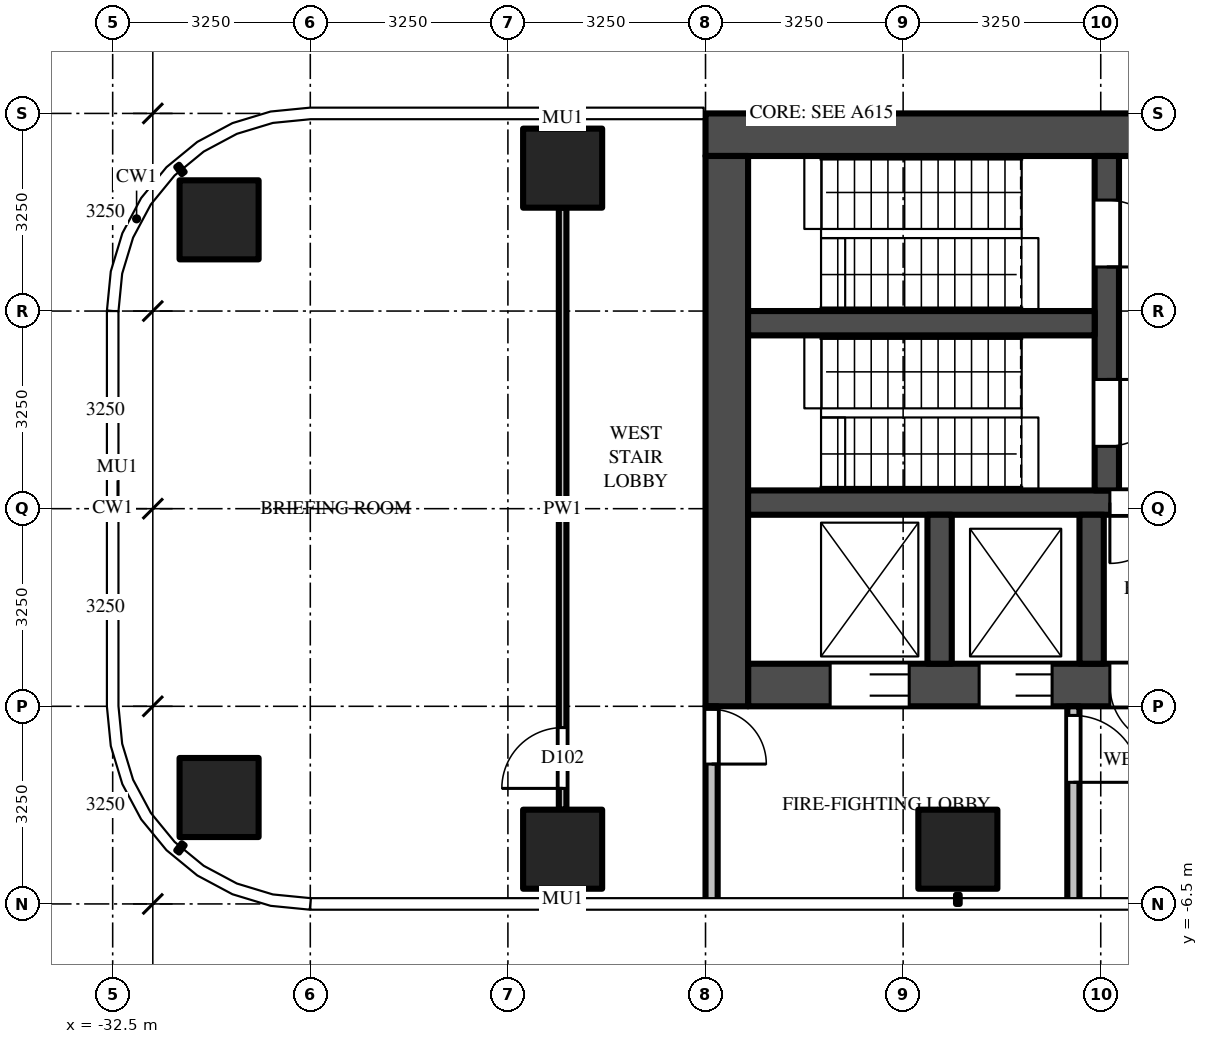
"""IFC4 building model, lengths in metres.
Left out: names, types, materials, properties, quantities, classifications, styles, units other than length and angle.
Written with IfcOpenShell. Run it as: python <this file> out.ifc"""

import sys

from ifc_helpers import new_model, si_unit, direction, frame, frame_2d, origin, origin_2d, place, context, subcontext, project, spatial, rectangle, extrude, source, transform, mapped, element, fill, save


model = new_model("IFC4")
c1 = context("Model", 3, precision=1e-05, world=origin(), true_north=direction((0.0, 1.0)))
c2 = subcontext(c1, "Body", "Model", "MODEL_VIEW")
j1 = project(units=[si_unit("LENGTHUNIT", "METRE"), si_unit("PLANEANGLEUNIT", "RADIAN")], contexts=[c1])
p1 = place(None, origin())
s1 = spatial("IfcSite", under=j1, at=p1, CompositionType="ELEMENT")
p2 = place(p1, origin())
s2 = spatial("IfcBuilding", under=s1, at=p2, CompositionType="ELEMENT")
p3 = place(p2, frame((0.0, 0.0, 129.0)))
s3 = spatial("IfcBuildingStorey", under=s2, at=p3, CompositionType="ELEMENT", Elevation=129.0)
m1 = source(origin(), c2, "Body", "SweptSolid", [
    extrude(rectangle(XDim=1.3, YDim=1.3, at=origin_2d()), origin(), (0.0, 0.0, 1.0), 4.5),
])
for number, where, z_axis, x_axis in (
    (1, (-18.6, -5.6, 0.0), (0.0, 0.0, 1.0), (1.0, 0.0, 0.0)),
    (2, (-25.1, -5.6, 0.0), (0.0, 0.0, 1.0), (1.0, 0.0, 0.0)),
    (3, (-30.75, -4.75, 0.0), (0.0, 0.0, 1.0), (1.0, 0.0, 0.0)),
    (4, (-25.1, 5.6, 0.0), (0.0, 0.0, 1.0), (1.0, 0.0, 0.0)),
    (5, (-30.75, 4.75, 0.0), (0.0, 0.0, 1.0), (1.0, 0.0, 0.0)),
):
    element("IfcColumn", number, at=place(p3, frame(where, z_axis=z_axis, x_axis=x_axis)), inside=s3, PredefinedType="COLUMN", context=c2, shape_type="MappedRepresentation", body=[
        mapped(m1, transform((0.0, 0.0, 0.0))),
    ])
m2 = source(origin(), c2, "Body", "SweptSolid", [
    extrude(rectangle(XDim=16.5, YDim=0.7, at=frame_2d((8.25, 0.0))), origin(), (0.0, 0.0, 1.0), 4.25),
])
p4 = place(p3, frame((-6.25, 6.15, 0.0), z_axis=(0.0, 0.0, 1.0), x_axis=(-1.0, 0.0, 0.0)))
e6 = element("IfcWall", 6, at=p4, inside=s3, PredefinedType="SHEAR", context=c2, shape_type="MappedRepresentation", body=[
    mapped(m2, transform((0.0, 0.0, 0.0))),
])
m3 = source(origin(), c2, "Body", "SweptSolid", [
    extrude(rectangle(XDim=14.85, YDim=0.7, at=frame_2d((7.425, 0.0))), origin(), (0.0, 0.0, 1.0), 4.25),
])
p5 = place(p3, frame((-7.2, -2.9, 0.0), z_axis=(0.0, 0.0, 1.0), x_axis=(-1.0, 0.0, 0.0)))
e7 = element("IfcWall", 7, at=p5, inside=s3, PredefinedType="SHEAR", context=c2, shape_type="MappedRepresentation", body=[
    mapped(m3, transform((0.0, 0.0, 0.0))),
])
m4 = source(origin(), c2, "Body", "SweptSolid", [
    extrude(rectangle(XDim=1.3, YDim=2.1, at=frame_2d((0.65, 1.05))), frame((0.0, 0.36, 0.0), z_axis=(0.0, -1.0, 0.0), x_axis=(1.0, 0.0, 0.0)), (0.0, 0.0, 1.0), 0.72),
])
p6 = place(p5, frame((12.2, 0.0, 0.0)))
e8 = element("IfcOpeningElement", 8, at=p6, cuts=e7, PredefinedType="OPENING", context=c2, shape_type="MappedRepresentation", body=[
    mapped(m4, transform((0.0, 0.0, 0.0))),
])
m5 = source(origin(), c2, "Body", "SweptSolid", [
    extrude(rectangle(XDim=1.2, YDim=2.1, at=frame_2d((0.6, 1.05))), frame((0.0, 0.36, 0.0), z_axis=(0.0, -1.0, 0.0), x_axis=(1.0, 0.0, 0.0)), (0.0, 0.0, 1.0), 0.72),
])
p7 = place(p5, frame((9.85, 0.0, 0.0)))
e9 = element("IfcOpeningElement", 9, at=p7, cuts=e7, PredefinedType="OPENING", context=c2, shape_type="MappedRepresentation", body=[
    mapped(m5, transform((0.0, 0.0, 0.0))),
])
m6 = source(origin(), c2, "Body", "SweptSolid", [
    extrude(rectangle(XDim=1.0, YDim=2.1, at=frame_2d((0.5, 1.05))), frame((0.0, 0.36, 0.0), z_axis=(0.0, -1.0, 0.0), x_axis=(1.0, 0.0, 0.0)), (0.0, 0.0, 1.0), 0.72),
])
p8 = place(p5, frame((7.9, 0.0, 0.0)))
e10 = element("IfcOpeningElement", 10, at=p8, cuts=e7, PredefinedType="OPENING", context=c2, shape_type="MappedRepresentation", body=[
    mapped(m6, transform((0.0, 0.0, 0.0))),
])
m7 = source(origin(), c2, "Body", "SweptSolid", [
    extrude(rectangle(XDim=0.9, YDim=2.1, at=frame_2d((0.45, 1.05))), frame((0.0, 0.36, 0.0), z_axis=(0.0, -1.0, 0.0), x_axis=(1.0, 0.0, 0.0)), (0.0, 0.0, 1.0), 0.72),
])
p9 = place(p5, frame((0.65, 0.0, 0.0)))
e11 = element("IfcOpeningElement", 11, at=p9, cuts=e7, PredefinedType="OPENING", context=c2, shape_type="MappedRepresentation", body=[
    mapped(m7, transform((0.0, 0.0, 0.0))),
])
p10 = place(p5, frame((3.2, 0.0, 0.0)))
e12 = element("IfcOpeningElement", 12, at=p10, cuts=e7, PredefinedType="OPENING", context=c2, shape_type="MappedRepresentation", body=[
    mapped(m6, transform((0.0, 0.0, 0.0))),
])
p11 = place(p5, frame((5.85, 0.0, 0.0)))
e13 = element("IfcOpeningElement", 13, at=p11, cuts=e7, PredefinedType="OPENING", context=c2, shape_type="MappedRepresentation", body=[
    mapped(m7, transform((0.0, 0.0, 0.0))),
])
m8 = source(origin(), c2, "Body", "SweptSolid", [
    extrude(rectangle(XDim=9.05, YDim=0.7, at=frame_2d((4.525, 0.0))), origin(), (0.0, 0.0, 1.0), 4.25),
])
p12 = place(p3, frame((-22.4, 5.8, 0.0), z_axis=(0.0, 0.0, 1.0), x_axis=(0.0, -1.0, 0.0)))
e14 = element("IfcWall", 14, at=p12, inside=s3, PredefinedType="SHEAR", context=c2, shape_type="MappedRepresentation", body=[
    mapped(m8, transform((0.0, 0.0, 0.0))),
])
m9 = source(origin(), c2, "Body", "SweptSolid", [
    extrude(rectangle(XDim=14.85, YDim=0.4, at=frame_2d((7.425, 0.0))), origin(), (0.0, 0.0, 1.0), 4.25),
])
p13 = place(p3, frame((-7.2, 0.1, 0.0), z_axis=(0.0, 0.0, 1.0), x_axis=(-1.0, 0.0, 0.0)))
e15 = element("IfcWall", 15, at=p13, inside=s3, PredefinedType="SHEAR", context=c2, shape_type="MappedRepresentation", body=[
    mapped(m9, transform((0.0, 0.0, 0.0))),
])
m10 = source(origin(), c2, "Body", "SweptSolid", [
    extrude(rectangle(XDim=1.0, YDim=2.1, at=frame_2d((0.5, 1.05))), frame((0.0, 0.21, 0.0), z_axis=(0.0, -1.0, 0.0), x_axis=(1.0, 0.0, 0.0)), (0.0, 0.0, 1.0), 0.42),
])
p14 = place(p13, frame((7.9, 0.0, 0.0)))
e16 = element("IfcOpeningElement", 16, at=p14, cuts=e15, PredefinedType="OPENING", context=c2, shape_type="MappedRepresentation", body=[
    mapped(m10, transform((0.0, 0.0, 0.0))),
])
m11 = source(origin(), c2, "Body", "SweptSolid", [
    extrude(rectangle(XDim=5.5, YDim=0.4, at=frame_2d((2.75, 0.0))), origin(), (0.0, 0.0, 1.0), 4.25),
])
p15 = place(p3, frame((-16.15, 5.8, 0.0), z_axis=(0.0, 0.0, 1.0), x_axis=(0.0, -1.0, 0.0)))
e17 = element("IfcWall", 17, at=p15, inside=s3, PredefinedType="SHEAR", context=c2, shape_type="MappedRepresentation", body=[
    mapped(m11, transform((0.0, 0.0, 0.0))),
])
m12 = source(origin(), c2, "Body", "SweptSolid", [
    extrude(rectangle(XDim=1.1, YDim=2.1, at=frame_2d((0.55, 1.05))), frame((0.0, 0.21, 0.0), z_axis=(0.0, -1.0, 0.0), x_axis=(1.0, 0.0, 0.0)), (0.0, 0.0, 1.0), 0.42),
])
p16 = place(p15, frame((0.725, 0.0, 0.0)))
e18 = element("IfcOpeningElement", 18, at=p16, cuts=e17, PredefinedType="OPENING", context=c2, shape_type="MappedRepresentation", body=[
    mapped(m12, transform((0.0, 0.0, 0.0))),
])
p17 = place(p15, frame((3.675, 0.0, 0.0)))
e19 = element("IfcOpeningElement", 19, at=p17, cuts=e17, PredefinedType="OPENING", context=c2, shape_type="MappedRepresentation", body=[
    mapped(m12, transform((0.0, 0.0, 0.0))),
])
m13 = source(origin(), c2, "Body", "SweptSolid", [
    extrude(rectangle(XDim=5.7, YDim=0.4, at=frame_2d((2.85, 0.0))), origin(), (0.0, 0.0, 1.0), 4.25),
])
p18 = place(p3, frame((-16.35, 3.05, 0.0), z_axis=(0.0, 0.0, 1.0), x_axis=(-1.0, 0.0, 0.0)))
e20 = element("IfcWall", 20, at=p18, inside=s3, PredefinedType="SHEAR", context=c2, shape_type="MappedRepresentation", body=[
    mapped(m13, transform((0.0, 0.0, 0.0))),
])
m14 = source(origin(), c2, "Body", "SweptSolid", [
    extrude(rectangle(XDim=2.45, YDim=0.4, at=frame_2d((1.225, 0.0))), origin(), (0.0, 0.0, 1.0), 4.25),
])
for number, where, z_axis, x_axis in (
    (21, (-16.4, -0.1, 0.0), (0.0, 0.0, 1.0), (0.0, -1.0, 0.0)),
    (22, (-18.9, -0.1, 0.0), (0.0, 0.0, 1.0), (0.0, -1.0, 0.0)),
):
    element("IfcWall", number, at=place(p3, frame(where, z_axis=z_axis, x_axis=x_axis)), inside=s3, PredefinedType="SHEAR", context=c2, shape_type="MappedRepresentation", body=[
        mapped(m14, transform((0.0, 0.0, 0.0))),
    ])
m15 = source(origin(), c2, "Body", "SweptSolid", [
    extrude(rectangle(XDim=3.25, YDim=0.2, at=frame_2d((1.625, 0.0))), origin(), (0.0, 0.0, 1.0), 4.25),
])
p19 = place(p3, frame((-16.7, -3.25, 0.0), z_axis=(0.0, 0.0, 1.0), x_axis=(0.0, -1.0, 0.0)))
e23 = element("IfcWall", 23, at=p19, inside=s3, PredefinedType="PARTITIONING", context=c2, shape_type="MappedRepresentation", body=[
    mapped(m15, transform((0.0, 0.0, 0.0))),
])
m16 = source(origin(), c2, "Body", "SweptSolid", [
    extrude(rectangle(XDim=1.1, YDim=2.1, at=frame_2d((0.55, 1.05))), frame((0.0, 0.11, 0.0), z_axis=(0.0, -1.0, 0.0), x_axis=(1.0, 0.0, 0.0)), (0.0, 0.0, 1.0), 0.22),
])
p20 = place(p19, frame((0.15, 0.0, 0.0)))
e24 = element("IfcOpeningElement", 24, at=p20, cuts=e23, PredefinedType="OPENING", context=c2, shape_type="MappedRepresentation", body=[
    mapped(m16, transform((0.0, 0.0, 0.0))),
])
p21 = place(p3, frame((-22.65, -3.25, 0.0), z_axis=(0.0, 0.0, 1.0), x_axis=(0.0, -1.0, 0.0)))
e25 = element("IfcWall", 25, at=p21, inside=s3, PredefinedType="PARTITIONING", context=c2, shape_type="MappedRepresentation", body=[
    mapped(m15, transform((0.0, 0.0, 0.0))),
])
m17 = source(origin(), c2, "Body", "SweptSolid", [
    extrude(rectangle(XDim=0.9, YDim=2.1, at=frame_2d((0.45, 1.05))), frame((0.0, 0.11, 0.0), z_axis=(0.0, -1.0, 0.0), x_axis=(1.0, 0.0, 0.0)), (0.0, 0.0, 1.0), 0.22),
])
p22 = place(p21, frame((0.05, 0.0, 0.0)))
e26 = element("IfcOpeningElement", 26, at=p22, cuts=e25, PredefinedType="OPENING", context=c2, shape_type="MappedRepresentation", body=[
    mapped(m17, transform((0.0, 0.0, 0.0))),
])
m18 = source(origin(), c2, "Body", "SweptSolid", [
    extrude(rectangle(XDim=9.9, YDim=0.125, at=frame_2d((4.95, 0.0))), origin(), (0.0, 0.0, 1.0), 3.468),
])
p23 = place(p3, frame((-25.1, -4.95, 0.0), z_axis=(0.0, 0.0, 1.0), x_axis=(0.0, 1.0, 0.0)))
e27 = element("IfcWall", 27, at=p23, inside=s3, PredefinedType="PARTITIONING", context=c2, shape_type="MappedRepresentation", body=[
    mapped(m18, transform((0.0, 0.0, 0.0))),
])
m19 = source(origin(), c2, "Body", "SweptSolid", [
    extrude(rectangle(XDim=1.0, YDim=2.1, at=frame_2d((0.5, 1.05))), frame((0.0, 0.073, 0.0), z_axis=(0.0, -1.0, 0.0), x_axis=(1.0, 0.0, 0.0)), (0.0, 0.0, 1.0), 0.145),
])
p24 = place(p23, frame((0.35, 0.0, 0.0)))
e28 = element("IfcOpeningElement", 28, at=p24, cuts=e27, PredefinedType="OPENING", context=c2, shape_type="MappedRepresentation", body=[
    mapped(m19, transform((0.0, 0.0, 0.0))),
])
m20 = source(origin(), c2, "Body", "SweptSolid", [
    extrude(rectangle(XDim=1.3, YDim=2.1, at=frame_2d((0.65, 1.05))), frame((0.0, -0.275, 0.0), z_axis=(0.0, -1.0, 0.0), x_axis=(1.0, 0.0, 0.0)), (0.0, 0.0, 1.0), 0.05),
])
p25 = place(p6, origin())
e29 = element("IfcDoor", 29, at=p25, inside=s3, OperationType="DOUBLE_DOOR_SLIDING", PredefinedType="DOOR", context=c2, shape_type="MappedRepresentation", body=[
    mapped(m20, transform((0.0, 0.0, 0.0))),
])
fill(e8, e29)
m21 = source(origin(), c2, "Body", "SweptSolid", [
    extrude(rectangle(XDim=1.2, YDim=2.1, at=frame_2d((0.6, 1.05))), frame((0.0, -0.275, 0.0), z_axis=(0.0, -1.0, 0.0), x_axis=(1.0, 0.0, 0.0)), (0.0, 0.0, 1.0), 0.05),
])
p26 = place(p7, origin())
e30 = element("IfcDoor", 30, at=p26, inside=s3, OperationType="DOUBLE_DOOR_SLIDING", PredefinedType="DOOR", context=c2, shape_type="MappedRepresentation", body=[
    mapped(m21, transform((0.0, 0.0, 0.0))),
])
fill(e9, e30)
m22 = source(origin(), c2, "Body", "SweptSolid", [
    extrude(rectangle(XDim=1.1, YDim=2.1, at=frame_2d((0.55, 1.05))), frame((0.0, 0.025, 0.0), z_axis=(0.0, -1.0, 0.0), x_axis=(1.0, 0.0, 0.0)), (0.0, 0.0, 1.0), 0.05),
])
p27 = place(p16, origin())
e31 = element("IfcDoor", 31, at=p27, inside=s3, OperationType="SINGLE_SWING_RIGHT", PredefinedType="DOOR", context=c2, shape_type="MappedRepresentation", body=[
    mapped(m22, transform((0.0, 0.0, 0.0))),
])
fill(e18, e31)
p28 = place(p17, origin())
e32 = element("IfcDoor", 32, at=p28, inside=s3, OperationType="SINGLE_SWING_LEFT", PredefinedType="DOOR", context=c2, shape_type="MappedRepresentation", body=[
    mapped(m22, transform((0.0, 0.0, 0.0))),
])
fill(e19, e32)
m23 = source(origin(), c2, "Body", "SweptSolid", [
    extrude(rectangle(XDim=1.0, YDim=2.1, at=frame_2d((0.5, 1.05))), frame((0.0, 0.025, 0.0), z_axis=(0.0, -1.0, 0.0), x_axis=(1.0, 0.0, 0.0)), (0.0, 0.0, 1.0), 0.05),
])
p29 = place(p14, origin())
e33 = element("IfcDoor", 33, at=p29, inside=s3, OperationType="SINGLE_SWING_RIGHT", PredefinedType="DOOR", context=c2, shape_type="MappedRepresentation", body=[
    mapped(m23, transform((0.0, 0.0, 0.0))),
])
fill(e16, e33)
m24 = source(origin(), c2, "Body", "SweptSolid", [
    extrude(rectangle(XDim=1.0, YDim=2.1, at=frame_2d((0.5, 1.05))), frame((0.0, -0.275, 0.0), z_axis=(0.0, -1.0, 0.0), x_axis=(1.0, 0.0, 0.0)), (0.0, 0.0, 1.0), 0.05),
])
p30 = place(p8, origin())
e34 = element("IfcDoor", 34, at=p30, inside=s3, OperationType="SINGLE_SWING_LEFT", PredefinedType="DOOR", context=c2, shape_type="MappedRepresentation", body=[
    mapped(m24, transform((0.0, 0.0, 0.0))),
])
fill(e10, e34)
p31 = place(p20, origin())
e35 = element("IfcDoor", 35, at=p31, inside=s3, OperationType="SINGLE_SWING_RIGHT", PredefinedType="DOOR", context=c2, shape_type="MappedRepresentation", body=[
    mapped(m22, transform((0.0, 0.0, 0.0))),
])
fill(e24, e35)
m25 = source(origin(), c2, "Body", "SweptSolid", [
    extrude(rectangle(XDim=0.9, YDim=2.1, at=frame_2d((0.45, 1.05))), frame((0.0, 0.025, 0.0), z_axis=(0.0, -1.0, 0.0), x_axis=(1.0, 0.0, 0.0)), (0.0, 0.0, 1.0), 0.05),
])
p32 = place(p22, origin())
e36 = element("IfcDoor", 36, at=p32, inside=s3, OperationType="SINGLE_SWING_RIGHT", PredefinedType="DOOR", context=c2, shape_type="MappedRepresentation", body=[
    mapped(m25, transform((0.0, 0.0, 0.0))),
])
fill(e26, e36)
p33 = place(p24, origin())
e37 = element("IfcDoor", 37, at=p33, inside=s3, OperationType="SINGLE_SWING_LEFT", PredefinedType="DOOR", context=c2, shape_type="MappedRepresentation", body=[
    mapped(m23, transform((0.0, 0.0, 0.0))),
])
fill(e28, e37)
save(model, sys.argv[1])
